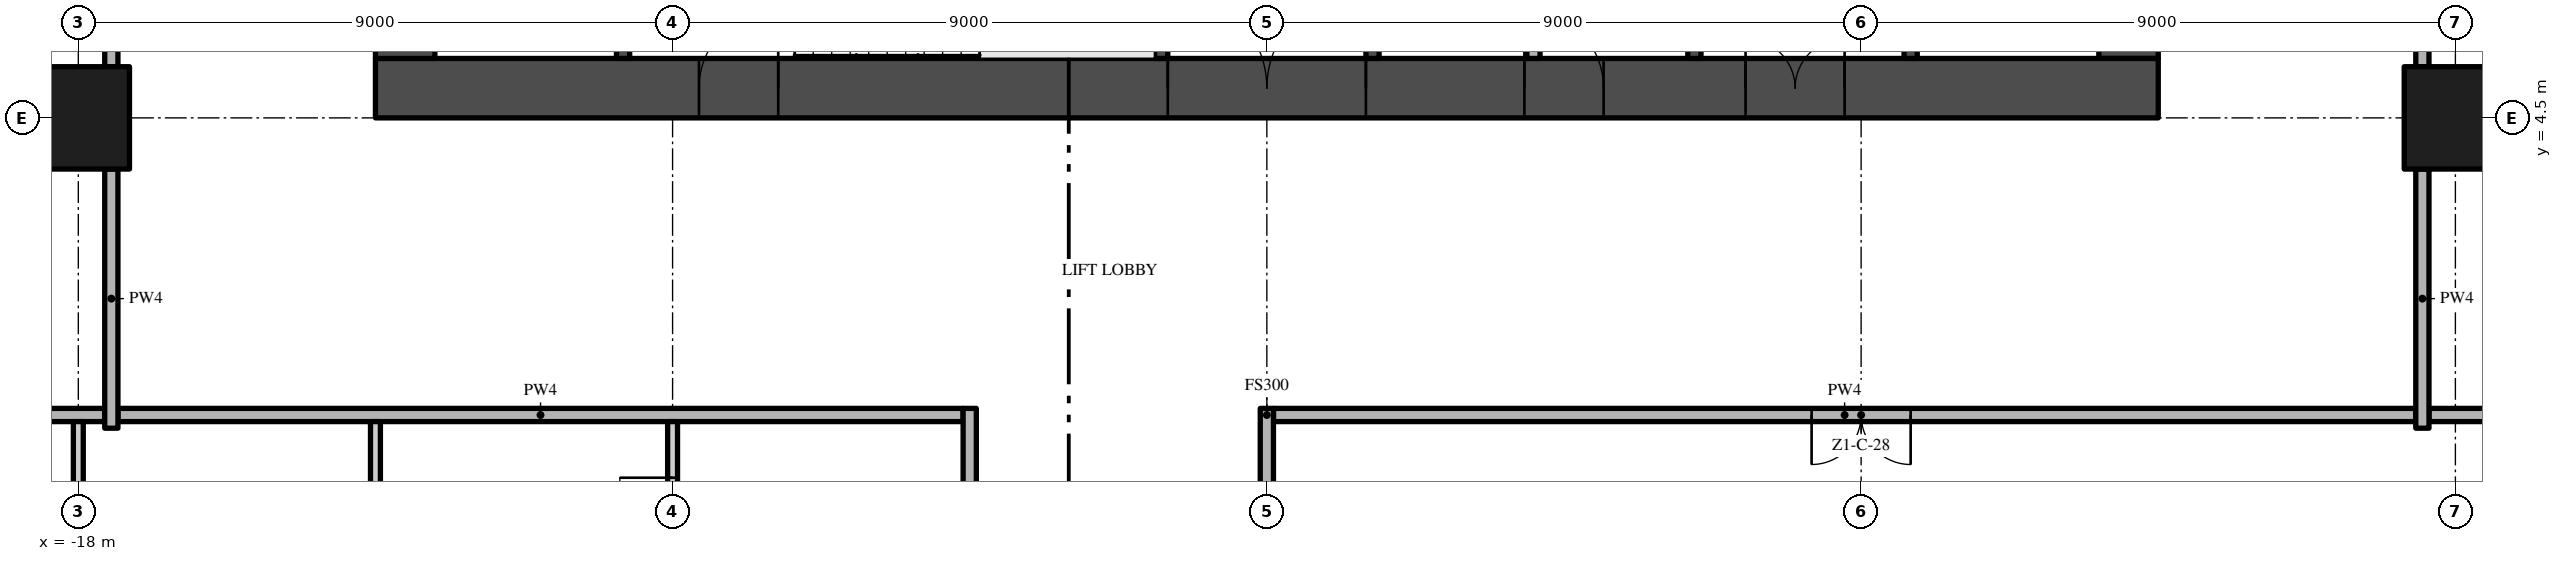
"""IFC4 building model, lengths in metres.
Left out: names, types, materials, properties, quantities, classifications, styles, units other than length and angle.
Written with IfcOpenShell. Run it as: python <this file> out.ifc"""

import sys

from ifc_helpers import new_model, si_unit, direction, frame, frame_2d, origin, origin_2d, place, context, subcontext, project, spatial, rectangle, extrude, element, fill, save


model = new_model("IFC4")
c1 = context("Model", 3, precision=1e-05, world=origin(), true_north=direction((0.0, 1.0)))
c2 = subcontext(c1, "Body", "Model", "MODEL_VIEW")
j1 = project(units=[si_unit("LENGTHUNIT", "METRE"), si_unit("PLANEANGLEUNIT", "RADIAN")], contexts=[c1])
p1 = place(None, origin())
s1 = spatial("IfcSite", under=j1, at=p1, CompositionType="ELEMENT")
p2 = place(p1, origin())
s2 = spatial("IfcBuilding", under=s1, at=p2, CompositionType="ELEMENT")
p3 = place(p2, frame((0.0, 0.0, 37.8)))
s3 = spatial("IfcBuildingStorey", under=s2, at=p3, CompositionType="ELEMENT", Elevation=37.8)
p4 = place(p3, frame((-13.5, 4.95, -0.3), z_axis=(0.0, 0.0, 1.0), x_axis=(1.0, 0.0, 0.0)))
e1 = element("IfcWall", 1, at=p4, inside=s3, PredefinedType="SHEAR", context=c2, shape_type="SweptSolid", body=[
    extrude(rectangle(XDim=27.0, YDim=0.9, at=frame_2d((13.5, 0.0))), origin(), (0.0, 0.0, 1.0), 3.8),
])
p5 = place(p4, frame((12.0, 0.0, 0.3)))
e2 = element("IfcOpeningElement", 2, at=p5, cuts=e1, PredefinedType="OPENING", context=c2, shape_type="SweptSolid", body=[
    extrude(rectangle(XDim=3.0, YDim=2.4, at=frame_2d((1.5, 1.2))), frame((0.0, 0.46, 0.0), z_axis=(0.0, -1.0, 0.0), x_axis=(1.0, 0.0, 0.0)), (0.0, 0.0, 1.0), 0.92),
])
p6 = place(p4, frame((4.9, 0.0, 0.3)))
e3 = element("IfcOpeningElement", 3, at=p6, cuts=e1, PredefinedType="OPENING", context=c2, shape_type="SweptSolid", body=[
    extrude(rectangle(XDim=1.2, YDim=2.2, at=frame_2d((0.6, 1.1))), frame((0.0, 0.46, 0.0), z_axis=(0.0, -1.0, 0.0), x_axis=(1.0, 0.0, 0.0)), (0.0, 0.0, 1.0), 0.92),
])
p7 = place(p4, frame((20.75, 0.0, 0.3)))
e4 = element("IfcOpeningElement", 4, at=p7, cuts=e1, PredefinedType="OPENING", context=c2, shape_type="SweptSolid", body=[
    extrude(rectangle(XDim=1.5, YDim=2.2, at=frame_2d((0.75, 1.1))), frame((0.0, 0.46, 0.0), z_axis=(0.0, -1.0, 0.0), x_axis=(1.0, 0.0, 0.0)), (0.0, 0.0, 1.0), 0.92),
])
p8 = place(p4, frame((17.4, 0.0, 0.3)))
e5 = element("IfcOpeningElement", 5, at=p8, cuts=e1, PredefinedType="OPENING", context=c2, shape_type="SweptSolid", body=[
    extrude(rectangle(XDim=1.2, YDim=2.2, at=frame_2d((0.6, 1.1))), frame((0.0, 0.46, 0.0), z_axis=(0.0, -1.0, 0.0), x_axis=(1.0, 0.0, 0.0)), (0.0, 0.0, 1.0), 0.92),
])
p9 = place(p3, frame((13.05, 5.4, -0.3), z_axis=(0.0, 0.0, 1.0), x_axis=(0.0, 1.0, 0.0)))
e6 = element("IfcWall", 6, at=p9, inside=s3, PredefinedType="SHEAR", context=c2, shape_type="SweptSolid", body=[
    extrude(rectangle(XDim=16.2, YDim=0.9, at=frame_2d((8.1, 0.0))), origin(), (0.0, 0.0, 1.0), 3.8),
])
p10 = place(p9, frame((6.0, 0.0, 0.3)))
e7 = element("IfcOpeningElement", 7, at=p10, cuts=e6, PredefinedType="OPENING", context=c2, shape_type="SweptSolid", body=[
    extrude(rectangle(XDim=1.2, YDim=2.2, at=frame_2d((0.6, 1.1))), frame((0.0, 0.46, 0.0), z_axis=(0.0, -1.0, 0.0), x_axis=(1.0, 0.0, 0.0)), (0.0, 0.0, 1.0), 0.92),
])
p11 = place(p3, frame((-13.05, 21.6, -0.3), z_axis=(0.0, 0.0, 1.0), x_axis=(0.0, -1.0, 0.0)))
e8 = element("IfcWall", 8, at=p11, inside=s3, PredefinedType="SHEAR", context=c2, shape_type="SweptSolid", body=[
    extrude(rectangle(XDim=16.2, YDim=0.9, at=frame_2d((8.1, 0.0))), origin(), (0.0, 0.0, 1.0), 3.8),
])
p12 = place(p11, frame((9.0, 0.0, 0.3)))
e9 = element("IfcOpeningElement", 9, at=p12, cuts=e8, PredefinedType="OPENING", context=c2, shape_type="SweptSolid", body=[
    extrude(rectangle(XDim=1.2, YDim=2.2, at=frame_2d((0.6, 1.1))), frame((0.0, 0.46, 0.0), z_axis=(0.0, -1.0, 0.0), x_axis=(1.0, 0.0, 0.0)), (0.0, 0.0, 1.0), 0.92),
])
for number, where, z_axis, x_axis in (
    (10, (-18.0, 4.5, 0.0), (0.0, 0.0, 1.0), (1.0, 0.0, 0.0)),
    (11, (18.0, 4.5, 0.0), (0.0, 0.0, 1.0), (1.0, 0.0, 0.0)),
):
    element("IfcColumn", number, at=place(p3, frame(where, z_axis=z_axis, x_axis=x_axis)), inside=s3, PredefinedType="COLUMN", context=c2, shape_type="SweptSolid", body=[
        extrude(rectangle(XDim=1.55, YDim=1.55, at=origin_2d()), origin(), (0.0, 0.0, 1.0), 3.5),
    ])
for number, where, z_axis, x_axis in (
    (12, (-9.75, 5.4, 0.0), (0.0, 0.0, 1.0), (0.0, 1.0, 0.0)),
    (13, (-1.6, 5.4, 0.0), (0.0, 0.0, 1.0), (0.0, 1.0, 0.0)),
):
    element("IfcWall", number, at=place(p3, frame(where, z_axis=z_axis, x_axis=x_axis)), inside=s3, PredefinedType="SHEAR", context=c2, shape_type="SweptSolid", body=[
        extrude(rectangle(XDim=2.55, YDim=0.2, at=frame_2d((1.275, 0.0))), origin(), (0.0, 0.0, 1.0), 3.5),
    ])
p13 = place(p3, frame((1.6, 9.8, 0.0), z_axis=(0.0, 0.0, 1.0), x_axis=(0.0, -1.0, 0.0)))
e14 = element("IfcWall", 14, at=p13, inside=s3, PredefinedType="SHEAR", context=c2, shape_type="SweptSolid", body=[
    extrude(rectangle(XDim=4.4, YDim=0.2, at=frame_2d((2.2, 0.0))), origin(), (0.0, 0.0, 1.0), 3.5),
])
p14 = place(p13, frame((1.35, 0.0, 0.0)))
e15 = element("IfcOpeningElement", 15, at=p14, cuts=e14, PredefinedType="OPENING", context=c2, shape_type="SweptSolid", body=[
    extrude(rectangle(XDim=0.9, YDim=2.1, at=frame_2d((0.45, 1.05))), frame((0.0, 0.11, 0.0), z_axis=(0.0, -1.0, 0.0), x_axis=(1.0, 0.0, 0.0)), (0.0, 0.0, 1.0), 0.22),
])
p15 = place(p3, frame((4.037, 9.8, 0.0), z_axis=(0.0, 0.0, 1.0), x_axis=(0.0, -1.0, 0.0)))
e16 = element("IfcWall", 16, at=p15, inside=s3, PredefinedType="PARTITIONING", context=c2, shape_type="SweptSolid", body=[
    extrude(rectangle(XDim=4.4, YDim=0.2, at=frame_2d((2.2, 0.0))), origin(), (0.0, 0.0, 1.0), 3.5),
])
p16 = place(p15, frame((1.75, 0.0, 0.0)))
e17 = element("IfcOpeningElement", 17, at=p16, cuts=e16, PredefinedType="OPENING", context=c2, shape_type="SweptSolid", body=[
    extrude(rectangle(XDim=0.9, YDim=2.1, at=frame_2d((0.45, 1.05))), frame((0.0, 0.11, 0.0), z_axis=(0.0, -1.0, 0.0), x_axis=(1.0, 0.0, 0.0)), (0.0, 0.0, 1.0), 0.22),
])
p17 = place(p3, frame((6.475, 5.4, 0.0), z_axis=(0.0, 0.0, 1.0), x_axis=(0.0, 1.0, 0.0)))
e18 = element("IfcWall", 18, at=p17, inside=s3, PredefinedType="SHEAR", context=c2, shape_type="SweptSolid", body=[
    extrude(rectangle(XDim=4.4, YDim=0.2, at=frame_2d((2.2, 0.0))), origin(), (0.0, 0.0, 1.0), 3.5),
])
p18 = place(p3, frame((9.75, 5.4, 0.0), z_axis=(0.0, 0.0, 1.0), x_axis=(0.0, 1.0, 0.0)))
e19 = element("IfcWall", 19, at=p18, inside=s3, PredefinedType="SHEAR", context=c2, shape_type="SweptSolid", body=[
    extrude(rectangle(XDim=2.2, YDim=0.2, at=frame_2d((1.1, 0.0))), origin(), (0.0, 0.0, 1.0), 3.5),
])
p19 = place(p18, frame((0.55, 0.0, 0.0)))
e20 = element("IfcOpeningElement", 20, at=p19, cuts=e19, PredefinedType="OPENING", context=c2, shape_type="SweptSolid", body=[
    extrude(rectangle(XDim=1.1, YDim=2.1, at=frame_2d((0.55, 1.05))), frame((0.0, 0.11, 0.0), z_axis=(0.0, -1.0, 0.0), x_axis=(1.0, 0.0, 0.0)), (0.0, 0.0, 1.0), 0.22),
])
p20 = place(p3, frame((-17.4, 0.0, 0.0), z_axis=(0.0, 0.0, 1.0), x_axis=(1.0, 0.0, 0.0)))
e21 = element("IfcWall", 21, at=p20, inside=s3, PredefinedType="PARTITIONING", context=c2, shape_type="SweptSolid", body=[
    extrude(rectangle(XDim=12.8, YDim=0.2, at=frame_2d((6.4, 0.0))), origin(), (0.0, 0.0, 1.0), 3.5),
])
p21 = place(p3, frame((17.4, 0.0, 0.0), z_axis=(0.0, 0.0, 1.0), x_axis=(-1.0, 0.0, 0.0)))
e22 = element("IfcWall", 22, at=p21, inside=s3, PredefinedType="PARTITIONING", context=c2, shape_type="SweptSolid", body=[
    extrude(rectangle(XDim=17.3, YDim=0.2, at=frame_2d((8.65, 0.0))), origin(), (0.0, 0.0, 1.0), 3.5),
])
p22 = place(p21, frame((7.65, 0.0, 0.0)))
e23 = element("IfcOpeningElement", 23, at=p22, cuts=e22, PredefinedType="OPENING", context=c2, shape_type="SweptSolid", body=[
    extrude(rectangle(XDim=1.5, YDim=2.4, at=frame_2d((0.75, 1.2))), frame((0.0, 0.11, 0.0), z_axis=(0.0, -1.0, 0.0), x_axis=(1.0, 0.0, 0.0)), (0.0, 0.0, 1.0), 0.22),
])
for number, where, z_axis, x_axis in (
    (24, (-26.7, 0.0, 0.0), (0.0, 0.0, 1.0), (1.0, 0.0, 0.0)),
    (25, (17.6, 0.0, 0.0), (0.0, 0.0, 1.0), (1.0, 0.0, 0.0)),
):
    element("IfcWall", number, at=place(p3, frame(where, z_axis=z_axis, x_axis=x_axis)), inside=s3, PredefinedType="PARTITIONING", context=c2, shape_type="SweptSolid", body=[
        extrude(rectangle(XDim=9.1, YDim=0.2, at=frame_2d((4.55, 0.0))), origin(), (0.0, 0.0, 1.0), 3.5),
    ])
p23 = place(p3, frame((-18.0, -3.725, 0.0), z_axis=(0.0, 0.0, 1.0), x_axis=(0.0, 1.0, 0.0)))
e26 = element("IfcWall", 26, at=p23, inside=s3, PredefinedType="PARTITIONING", context=c2, shape_type="SweptSolid", body=[
    extrude(rectangle(XDim=3.625, YDim=0.15, at=frame_2d((1.812, 0.0))), origin(), (0.0, 0.0, 1.0), 3.5),
])
p24 = place(p23, frame((1.0, 0.0, 0.0)))
e27 = element("IfcOpeningElement", 27, at=p24, cuts=e26, PredefinedType="OPENING", context=c2, shape_type="SweptSolid", body=[
    extrude(rectangle(XDim=1.0, YDim=2.4, at=frame_2d((0.5, 1.2))), frame((0.0, 0.085, 0.0), z_axis=(0.0, -1.0, 0.0), x_axis=(1.0, 0.0, 0.0)), (0.0, 0.0, 1.0), 0.17),
])
p25 = place(p3, frame((-17.5, -0.2, 0.0), z_axis=(0.0, 0.0, 1.0), x_axis=(0.0, 1.0, 0.0)))
e28 = element("IfcWall", 28, at=p25, inside=s3, PredefinedType="PARTITIONING", context=c2, shape_type="SweptSolid", body=[
    extrude(rectangle(XDim=3.925, YDim=0.2, at=frame_2d((1.962, 0.0))), origin(), (0.0, 0.0, 1.0), 3.5),
])
p26 = place(p3, frame((-17.5, 5.275, 0.0), z_axis=(0.0, 0.0, 1.0), x_axis=(0.0, 1.0, 0.0)))
e29 = element("IfcWall", 29, at=p26, inside=s3, PredefinedType="PARTITIONING", context=c2, shape_type="SweptSolid", body=[
    extrude(rectangle(XDim=7.45, YDim=0.2, at=frame_2d((3.725, 0.0))), origin(), (0.0, 0.0, 1.0), 3.5),
])
p27 = place(p26, frame((3.125, 0.0, 0.0)))
e30 = element("IfcOpeningElement", 30, at=p27, cuts=e29, PredefinedType="OPENING", context=c2, shape_type="SweptSolid", body=[
    extrude(rectangle(XDim=1.2, YDim=2.4, at=frame_2d((0.6, 1.2))), frame((0.0, 0.11, 0.0), z_axis=(0.0, -1.0, 0.0), x_axis=(1.0, 0.0, 0.0)), (0.0, 0.0, 1.0), 0.22),
])
p28 = place(p3, frame((-13.5, -0.1, 0.0), z_axis=(0.0, 0.0, 1.0), x_axis=(0.0, -1.0, 0.0)))
e31 = element("IfcWall", 31, at=p28, inside=s3, PredefinedType="PARTITIONING", context=c2, shape_type="SweptSolid", body=[
    extrude(rectangle(XDim=7.475, YDim=0.15, at=frame_2d((3.737, 0.0))), origin(), (0.0, 0.0, 1.0), 3.5),
])
p29 = place(p28, frame((3.1, 0.0, 0.0)))
e32 = element("IfcOpeningElement", 32, at=p29, cuts=e31, PredefinedType="OPENING", context=c2, shape_type="SweptSolid", body=[
    extrude(rectangle(XDim=0.8, YDim=2.0, at=frame_2d((0.4, 1.0))), frame((0.0, 0.085, 0.0), z_axis=(0.0, -1.0, 0.0), x_axis=(1.0, 0.0, 0.0)), (0.0, 0.0, 1.0), 0.17),
])
p30 = place(p3, frame((-9.0, -3.725, 0.0), z_axis=(0.0, 0.0, 1.0), x_axis=(0.0, 1.0, 0.0)))
e33 = element("IfcWall", 33, at=p30, inside=s3, PredefinedType="PARTITIONING", context=c2, shape_type="SweptSolid", body=[
    extrude(rectangle(XDim=3.625, YDim=0.15, at=frame_2d((1.812, 0.0))), origin(), (0.0, 0.0, 1.0), 3.5),
])
p31 = place(p30, frame((1.975, 0.0, 0.0)))
e34 = element("IfcOpeningElement", 34, at=p31, cuts=e33, PredefinedType="OPENING", context=c2, shape_type="SweptSolid", body=[
    extrude(rectangle(XDim=0.8, YDim=2.0, at=frame_2d((0.4, 1.0))), frame((0.0, 0.085, 0.0), z_axis=(0.0, -1.0, 0.0), x_axis=(1.0, 0.0, 0.0)), (0.0, 0.0, 1.0), 0.17),
])
p32 = place(p3, frame((-4.5, -22.2, 0.0), z_axis=(0.0, 0.0, 1.0), x_axis=(0.0, 1.0, 0.0)))
e35 = element("IfcWall", 35, at=p32, inside=s3, PredefinedType="PARTITIONING", context=c2, shape_type="SweptSolid", body=[
    extrude(rectangle(XDim=22.3, YDim=0.2, at=frame_2d((11.15, 0.0))), origin(), (0.0, 0.0, 1.0), 3.5),
])
p33 = place(p32, frame((10.2, 0.0, 0.0)))
e36 = element("IfcOpeningElement", 36, at=p33, cuts=e35, PredefinedType="OPENING", context=c2, shape_type="SweptSolid", body=[
    extrude(rectangle(XDim=1.5, YDim=2.4, at=frame_2d((0.75, 1.2))), frame((0.0, 0.11, 0.0), z_axis=(0.0, -1.0, 0.0), x_axis=(1.0, 0.0, 0.0)), (0.0, 0.0, 1.0), 0.22),
])
p34 = place(p3, frame((0.0, -3.725, 0.0), z_axis=(0.0, 0.0, 1.0), x_axis=(0.0, 1.0, 0.0)))
e37 = element("IfcWall", 37, at=p34, inside=s3, PredefinedType="PARTITIONING", context=c2, shape_type="SweptSolid", body=[
    extrude(rectangle(XDim=3.825, YDim=0.2, at=frame_2d((1.913, 0.0))), origin(), (0.0, 0.0, 1.0), 3.5),
])
p35 = place(p3, frame((17.5, -0.2, 0.0), z_axis=(0.0, 0.0, 1.0), x_axis=(0.0, 1.0, 0.0)))
e38 = element("IfcWall", 38, at=p35, inside=s3, PredefinedType="PARTITIONING", context=c2, shape_type="SweptSolid", body=[
    extrude(rectangle(XDim=3.925, YDim=0.2, at=frame_2d((1.962, 0.0))), origin(), (0.0, 0.0, 1.0), 3.5),
])
p36 = place(p3, frame((17.5, 12.725, 0.0), z_axis=(0.0, 0.0, 1.0), x_axis=(0.0, -1.0, 0.0)))
e39 = element("IfcWall", 39, at=p36, inside=s3, PredefinedType="PARTITIONING", context=c2, shape_type="SweptSolid", body=[
    extrude(rectangle(XDim=7.45, YDim=0.2, at=frame_2d((3.725, 0.0))), origin(), (0.0, 0.0, 1.0), 3.5),
])
p37 = place(p36, frame((3.125, 0.0, 0.0)))
e40 = element("IfcOpeningElement", 40, at=p37, cuts=e39, PredefinedType="OPENING", context=c2, shape_type="SweptSolid", body=[
    extrude(rectangle(XDim=1.2, YDim=2.4, at=frame_2d((0.6, 1.2))), frame((0.0, 0.11, 0.0), z_axis=(0.0, -1.0, 0.0), x_axis=(1.0, 0.0, 0.0)), (0.0, 0.0, 1.0), 0.22),
])
p38 = place(p5, frame((3.0, 0.0, 0.0), z_axis=(0.0, 0.0, 1.0), x_axis=(-1.0, 0.0, 0.0)))
e41 = element("IfcDoor", 41, at=p38, inside=s3, OperationType="DOUBLE_DOOR_SINGLE_SWING", PredefinedType="DOOR", context=c2, shape_type="SweptSolid", body=[
    extrude(rectangle(XDim=3.0, YDim=2.4, at=frame_2d((1.5, 1.2))), frame((0.0, 0.025, 0.0), z_axis=(0.0, -1.0, 0.0), x_axis=(1.0, 0.0, 0.0)), (0.0, 0.0, 1.0), 0.05),
])
fill(e2, e41)
p39 = place(p6, frame((1.2, 0.0, 0.0), z_axis=(0.0, 0.0, 1.0), x_axis=(-1.0, 0.0, 0.0)))
e42 = element("IfcDoor", 42, at=p39, inside=s3, OperationType="SINGLE_SWING_LEFT", PredefinedType="DOOR", context=c2, shape_type="SweptSolid", body=[
    extrude(rectangle(XDim=1.2, YDim=2.2, at=frame_2d((0.6, 1.1))), frame((0.0, 0.025, 0.0), z_axis=(0.0, -1.0, 0.0), x_axis=(1.0, 0.0, 0.0)), (0.0, 0.0, 1.0), 0.05),
])
fill(e3, e42)
p40 = place(p7, frame((1.5, 0.0, 0.0), z_axis=(0.0, 0.0, 1.0), x_axis=(-1.0, 0.0, 0.0)))
e43 = element("IfcDoor", 43, at=p40, inside=s3, OperationType="DOUBLE_DOOR_SINGLE_SWING", PredefinedType="DOOR", context=c2, shape_type="SweptSolid", body=[
    extrude(rectangle(XDim=1.5, YDim=2.2, at=frame_2d((0.75, 1.1))), frame((0.0, 0.025, 0.0), z_axis=(0.0, -1.0, 0.0), x_axis=(1.0, 0.0, 0.0)), (0.0, 0.0, 1.0), 0.05),
])
fill(e4, e43)
p41 = place(p8, frame((1.2, 0.0, 0.0), z_axis=(0.0, 0.0, 1.0), x_axis=(-1.0, 0.0, 0.0)))
e44 = element("IfcDoor", 44, at=p41, inside=s3, OperationType="SINGLE_SWING_RIGHT", PredefinedType="DOOR", context=c2, shape_type="SweptSolid", body=[
    extrude(rectangle(XDim=1.2, YDim=2.2, at=frame_2d((0.6, 1.1))), frame((0.0, 0.025, 0.0), z_axis=(0.0, -1.0, 0.0), x_axis=(1.0, 0.0, 0.0)), (0.0, 0.0, 1.0), 0.05),
])
fill(e5, e44)
p42 = place(p31, origin())
e45 = element("IfcDoor", 45, at=p42, inside=s3, OperationType="SINGLE_SWING_RIGHT", PredefinedType="DOOR", context=c2, shape_type="SweptSolid", body=[
    extrude(rectangle(XDim=0.8, YDim=2.0, at=frame_2d((0.4, 1.0))), frame((0.0, 0.025, 0.0), z_axis=(0.0, -1.0, 0.0), x_axis=(1.0, 0.0, 0.0)), (0.0, 0.0, 1.0), 0.05),
])
fill(e34, e45)
p43 = place(p22, origin())
e46 = element("IfcDoor", 46, at=p43, inside=s3, OperationType="DOUBLE_DOOR_SINGLE_SWING", PredefinedType="DOOR", context=c2, shape_type="SweptSolid", body=[
    extrude(rectangle(XDim=1.5, YDim=2.4, at=frame_2d((0.75, 1.2))), frame((0.0, 0.025, 0.0), z_axis=(0.0, -1.0, 0.0), x_axis=(1.0, 0.0, 0.0)), (0.0, 0.0, 1.0), 0.05),
])
fill(e23, e46)
save(model, sys.argv[1])
